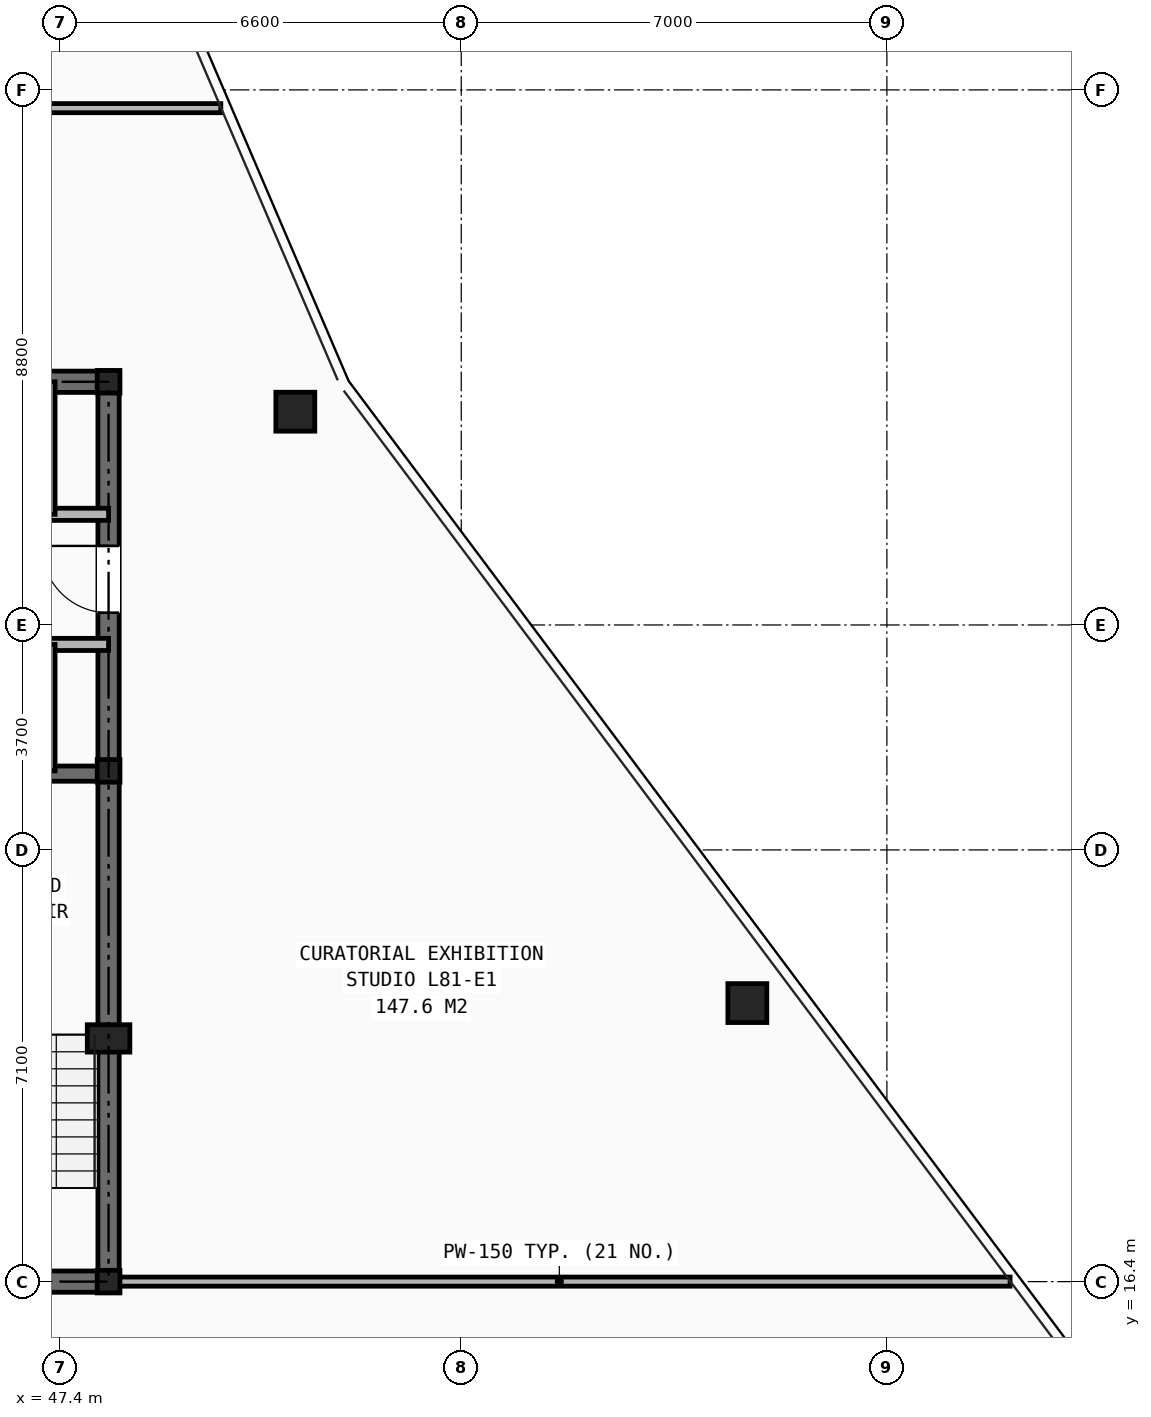
"""IFC4 building model, lengths in metres.
Left out: names, types, materials, properties, quantities, classifications, styles, units other than length and angle.
Written with IfcOpenShell. Run it as: python <this file> out.ifc"""

import sys

from ifc_helpers import new_model, si_unit, direction, frame, frame_2d, origin, origin_2d, place, context, subcontext, project, spatial, rectangle, hollow_rectangle, i_section, extrude, element, fill, save


model = new_model("IFC4")
c1 = context("Model", 3, precision=1e-05, world=origin(), true_north=direction((0.0, 1.0)))
c2 = subcontext(c1, "Body", "Model", "MODEL_VIEW")
j1 = project(units=[si_unit("LENGTHUNIT", "METRE"), si_unit("PLANEANGLEUNIT", "RADIAN")], contexts=[c1])
p1 = place(None, origin())
s1 = spatial("IfcSite", under=j1, at=p1, CompositionType="ELEMENT")
p2 = place(p1, origin())
s2 = spatial("IfcBuilding", under=s1, at=p2, CompositionType="ELEMENT")
p3 = place(p2, frame((0.0, 0.0, 286.5)))
s3 = spatial("IfcBuildingStorey", under=s2, at=p3, CompositionType="ELEMENT", Elevation=286.5)
for number, where, z_axis, x_axis in (
    (1, (48.2, 16.4, 0.0), (0.0, 0.0, 1.0), (1.0, 0.0, 0.0)),
    (2, (48.2, 24.8, 0.0), (0.0, 0.0, 1.0), (1.0, 0.0, 0.0)),
    (3, (48.2, 31.2, 0.0), (0.0, 0.0, 1.0), (1.0, 0.0, 0.0)),
):
    element("IfcColumn", number, at=place(p3, frame(where, z_axis=z_axis, x_axis=x_axis)), inside=s3, PredefinedType="COLUMN", context=c2, shape_type="SweptSolid", body=[
        extrude(i_section(OverallWidth=0.374, OverallDepth=0.372, WebThickness=0.016, FlangeThickness=0.026, at=origin_2d()), origin(), (0.0, 0.0, 1.0), 3.5),
    ])
p4 = place(p3, frame((48.2, 20.4, 0.0), z_axis=(0.0, 0.0, 1.0), x_axis=(1.0, 0.0, 0.0)))
e4 = element("IfcColumn", 4, at=p4, inside=s3, PredefinedType="PILASTER", context=c2, shape_type="SweptSolid", body=[
    extrude(rectangle(XDim=0.7, YDim=0.45, at=origin_2d()), origin(), (0.0, 0.0, 1.0), 3.5),
])
for number, where, z_axis, x_axis in (
    (5, (58.705, 20.981, 0.0), (0.0, 0.0, 1.0), (1.0, 0.0, 0.0)),
    (6, (51.271, 30.708, 0.0), (0.0, 0.0, 1.0), (1.0, 0.0, 0.0)),
):
    element("IfcColumn", number, at=place(p3, frame(where, z_axis=z_axis, x_axis=x_axis)), inside=s3, PredefinedType="COLUMN", context=c2, shape_type="SweptSolid", body=[
        extrude(hollow_rectangle(XDim=0.64, YDim=0.64, WallThickness=0.045, at=origin_2d()), origin(), (0.0, 0.0, 1.0), 3.5),
    ])
p5 = place(p3, frame((31.8, 16.4, 0.0), z_axis=(0.0, 0.0, 1.0), x_axis=(1.0, 0.0, 0.0)))
e7 = element("IfcWall", 7, at=p5, inside=s3, PredefinedType="SHEAR", context=c2, shape_type="SweptSolid", body=[
    extrude(rectangle(XDim=16.4, YDim=0.35, at=frame_2d((8.2, 0.0))), origin(), (0.0, 0.0, 1.0), 3.2),
])
p6 = place(p5, frame((7.75, 0.0, 0.0)))
e8 = element("IfcOpeningElement", 8, at=p6, cuts=e7, PredefinedType="OPENING", context=c2, shape_type="SweptSolid", body=[
    extrude(rectangle(XDim=0.9, YDim=2.1, at=frame_2d((0.45, 1.05))), frame((0.0, 0.185, 0.0), z_axis=(0.0, -1.0, 0.0), x_axis=(1.0, 0.0, 0.0)), (0.0, 0.0, 1.0), 0.37),
])
p7 = place(p5, frame((4.2, 0.0, 0.0)))
e9 = element("IfcOpeningElement", 9, at=p7, cuts=e7, PredefinedType="OPENING", context=c2, shape_type="SweptSolid", body=[
    extrude(rectangle(XDim=0.95, YDim=2.1, at=frame_2d((0.475, 1.05))), frame((0.0, 0.185, 0.0), z_axis=(0.0, -1.0, 0.0), x_axis=(1.0, 0.0, 0.0)), (0.0, 0.0, 1.0), 0.37),
])
p8 = place(p5, frame((10.6, 0.0, 0.0)))
e10 = element("IfcOpeningElement", 10, at=p8, cuts=e7, PredefinedType="OPENING", context=c2, shape_type="SweptSolid", body=[
    extrude(rectangle(XDim=0.95, YDim=2.1, at=frame_2d((0.475, 1.05))), frame((0.0, 0.185, 0.0), z_axis=(0.0, -1.0, 0.0), x_axis=(1.0, 0.0, 0.0)), (0.0, 0.0, 1.0), 0.37),
])
p9 = place(p3, frame((31.8, 31.2, 0.0), z_axis=(0.0, 0.0, 1.0), x_axis=(1.0, 0.0, 0.0)))
e11 = element("IfcWall", 11, at=p9, inside=s3, PredefinedType="SHEAR", context=c2, shape_type="SweptSolid", body=[
    extrude(rectangle(XDim=16.4, YDim=0.35, at=frame_2d((8.2, 0.0))), origin(), (0.0, 0.0, 1.0), 3.2),
])
p10 = place(p3, frame((48.2, 16.4, 0.0), z_axis=(0.0, 0.0, 1.0), x_axis=(0.0, 1.0, 0.0)))
e12 = element("IfcWall", 12, at=p10, inside=s3, PredefinedType="SHEAR", context=c2, shape_type="SweptSolid", body=[
    extrude(rectangle(XDim=14.8, YDim=0.35, at=frame_2d((7.4, 0.0))), origin(), (0.0, 0.0, 1.0), 3.2),
])
p11 = place(p10, frame((11.0, 0.0, 0.0)))
e13 = element("IfcOpeningElement", 13, at=p11, cuts=e12, PredefinedType="OPENING", context=c2, shape_type="SweptSolid", body=[
    extrude(rectangle(XDim=1.1, YDim=2.15, at=frame_2d((0.55, 1.075))), frame((0.0, 0.185, 0.0), z_axis=(0.0, -1.0, 0.0), x_axis=(1.0, 0.0, 0.0)), (0.0, 0.0, 1.0), 0.37),
])
p12 = place(p3, frame((44.955, 24.755, 0.0), z_axis=(0.0, 0.0, 1.0), x_axis=(1.0, 0.0, 0.0)))
e14 = element("IfcWall", 14, at=p12, inside=s3, PredefinedType="SHEAR", context=c2, shape_type="SweptSolid", body=[
    extrude(rectangle(XDim=3.245, YDim=0.25, at=frame_2d((1.623, 0.0))), origin(), (0.0, 0.0, 1.0), 3.2),
])
p13 = place(p3, frame((33.82, 29.02, 0.0), z_axis=(0.0, 0.0, 1.0), x_axis=(1.0, 0.0, 0.0)))
e15 = element("IfcWall", 15, at=p13, inside=s3, PredefinedType="SOLIDWALL", context=c2, shape_type="SweptSolid", body=[
    extrude(rectangle(XDim=14.38, YDim=0.2, at=frame_2d((7.19, 0.0))), origin(), (0.0, 0.0, 1.0), 2.655),
])
p14 = place(p13, frame((1.78, 0.0, 0.0)))
e16 = element("IfcOpeningElement", 16, at=p14, cuts=e15, PredefinedType="OPENING", context=c2, shape_type="SweptSolid", body=[
    extrude(rectangle(XDim=0.9, YDim=2.1, at=frame_2d((0.45, 1.05))), frame((0.0, 0.11, 0.0), z_axis=(0.0, -1.0, 0.0), x_axis=(1.0, 0.0, 0.0)), (0.0, 0.0, 1.0), 0.22),
])
p15 = place(p13, frame((6.07, 0.0, 0.0)))
e17 = element("IfcOpeningElement", 17, at=p15, cuts=e15, PredefinedType="OPENING", context=c2, shape_type="SweptSolid", body=[
    extrude(rectangle(XDim=0.9, YDim=2.1, at=frame_2d((0.45, 1.05))), frame((0.0, 0.11, 0.0), z_axis=(0.0, -1.0, 0.0), x_axis=(1.0, 0.0, 0.0)), (0.0, 0.0, 1.0), 0.22),
])
p16 = place(p13, frame((9.39, 0.0, 0.0)))
e18 = element("IfcOpeningElement", 18, at=p16, cuts=e15, PredefinedType="OPENING", context=c2, shape_type="SweptSolid", body=[
    extrude(rectangle(XDim=1.1, YDim=2.15, at=frame_2d((0.55, 1.075))), frame((0.0, 0.11, 0.0), z_axis=(0.0, -1.0, 0.0), x_axis=(1.0, 0.0, 0.0)), (0.0, 0.0, 1.0), 0.22),
])
p17 = place(p13, frame((11.71, 0.0, 0.0)))
e19 = element("IfcOpeningElement", 19, at=p17, cuts=e15, PredefinedType="OPENING", context=c2, shape_type="SweptSolid", body=[
    extrude(rectangle(XDim=1.1, YDim=2.15, at=frame_2d((0.55, 1.075))), frame((0.0, 0.11, 0.0), z_axis=(0.0, -1.0, 0.0), x_axis=(1.0, 0.0, 0.0)), (0.0, 0.0, 1.0), 0.22),
])
p18 = place(p3, frame((31.8, 26.88, 0.0), z_axis=(0.0, 0.0, 1.0), x_axis=(1.0, 0.0, 0.0)))
e20 = element("IfcWall", 20, at=p18, inside=s3, PredefinedType="SOLIDWALL", context=c2, shape_type="SweptSolid", body=[
    extrude(rectangle(XDim=16.4, YDim=0.2, at=frame_2d((8.2, 0.0))), origin(), (0.0, 0.0, 1.0), 2.655),
])
p19 = place(p18, frame((0.55, 0.0, 0.0)))
e21 = element("IfcOpeningElement", 21, at=p19, cuts=e20, PredefinedType="OPENING", context=c2, shape_type="SweptSolid", body=[
    extrude(rectangle(XDim=0.85, YDim=2.05, at=frame_2d((0.425, 1.025))), frame((0.0, 0.11, 0.0), z_axis=(0.0, -1.0, 0.0), x_axis=(1.0, 0.0, 0.0)), (0.0, 0.0, 1.0), 0.22),
])
p20 = place(p18, frame((5.94, 0.0, 0.0)))
e22 = element("IfcOpeningElement", 22, at=p20, cuts=e20, PredefinedType="OPENING", context=c2, shape_type="SweptSolid", body=[
    extrude(rectangle(XDim=0.9, YDim=2.1, at=frame_2d((0.45, 1.05))), frame((0.0, 0.11, 0.0), z_axis=(0.0, -1.0, 0.0), x_axis=(1.0, 0.0, 0.0)), (0.0, 0.0, 1.0), 0.22),
])
p21 = place(p18, frame((11.41, 0.0, 0.0)))
e23 = element("IfcOpeningElement", 23, at=p21, cuts=e20, PredefinedType="OPENING", context=c2, shape_type="SweptSolid", body=[
    extrude(rectangle(XDim=1.1, YDim=2.15, at=frame_2d((0.55, 1.075))), frame((0.0, 0.11, 0.0), z_axis=(0.0, -1.0, 0.0), x_axis=(1.0, 0.0, 0.0)), (0.0, 0.0, 1.0), 0.22),
])
p22 = place(p18, frame((13.73, 0.0, 0.0)))
e24 = element("IfcOpeningElement", 24, at=p22, cuts=e20, PredefinedType="OPENING", context=c2, shape_type="SweptSolid", body=[
    extrude(rectangle(XDim=1.1, YDim=2.15, at=frame_2d((0.55, 1.075))), frame((0.0, 0.11, 0.0), z_axis=(0.0, -1.0, 0.0), x_axis=(1.0, 0.0, 0.0)), (0.0, 0.0, 1.0), 0.22),
])
p23 = place(p3, frame((47.24, 29.02, 0.0), z_axis=(0.0, 0.0, 1.0), x_axis=(0.0, 1.0, 0.0)))
e25 = element("IfcWall", 25, at=p23, inside=s3, PredefinedType="SOLIDWALL", context=c2, shape_type="SweptSolid", body=[
    extrude(rectangle(XDim=2.18, YDim=0.16, at=frame_2d((1.09, 0.0))), origin(), (0.0, 0.0, 1.0), 2.655),
])
p24 = place(p3, frame((47.24, 24.8, 0.0), z_axis=(0.0, 0.0, 1.0), x_axis=(0.0, 1.0, 0.0)))
e26 = element("IfcWall", 26, at=p24, inside=s3, PredefinedType="SOLIDWALL", context=c2, shape_type="SweptSolid", body=[
    extrude(rectangle(XDim=2.08, YDim=0.16, at=frame_2d((1.04, 0.0))), origin(), (0.0, 0.0, 1.0), 3.2),
])
p25 = place(p3, frame((48.2, 16.4, 0.0), z_axis=(0.0, 0.0, 1.0), x_axis=(1.0, 0.0, 0.0)))
e27 = element("IfcWall", 27, at=p25, inside=s3, PredefinedType="PARTITIONING", context=c2, shape_type="SweptSolid", body=[
    extrude(rectangle(XDim=14.826, YDim=0.15, at=frame_2d((7.413, 0.0))), origin(), (0.0, 0.0, 1.0), 2.242),
])
p26 = place(p3, frame((46.8, 35.7, 0.0), z_axis=(0.0, 0.0, 1.0), x_axis=(1.0, 0.0, 0.0)))
e28 = element("IfcWall", 28, at=p26, inside=s3, PredefinedType="PARTITIONING", context=c2, shape_type="SweptSolid", body=[
    extrude(rectangle(XDim=3.246, YDim=0.15, at=frame_2d((1.623, 0.0))), origin(), (0.0, 0.0, 1.0), 2.578),
])
p27 = place(p11, origin())
e29 = element("IfcDoor", 29, at=p27, inside=s3, OperationType="SINGLE_SWING_RIGHT", PredefinedType="DOOR", context=c2, shape_type="SweptSolid", body=[
    extrude(rectangle(XDim=1.1, YDim=2.15, at=frame_2d((0.55, 1.075))), frame((0.0, 0.025, 0.0), z_axis=(0.0, -1.0, 0.0), x_axis=(1.0, 0.0, 0.0)), (0.0, 0.0, 1.0), 0.05),
])
fill(e13, e29)
save(model, sys.argv[1])
